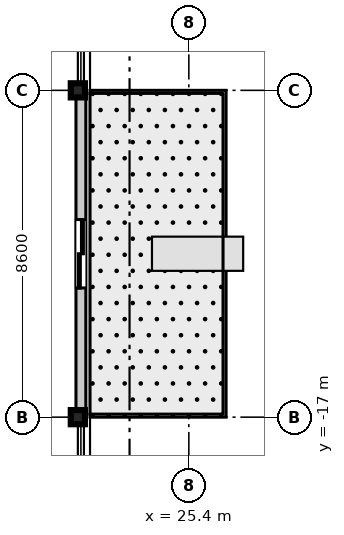
"""IFC4 building model, lengths in metres.
Left out: names, types, materials, properties, quantities, classifications, styles, units other than length and angle.
Written with IfcOpenShell. Run it as: python <this file> out.ifc"""

import sys

from ifc_helpers import new_model, si_unit, direction, frame, frame_2d, origin, origin_2d, place, context, subcontext, project, spatial, rectangle, i_section, extrude, source, transform, mapped, element, fill, save


model = new_model("IFC4")
c1 = context("Model", 3, precision=1e-05, world=origin(), true_north=direction((0.0, 1.0)))
c2 = subcontext(c1, "Body", "Model", "MODEL_VIEW")
j1 = project(units=[si_unit("LENGTHUNIT", "METRE"), si_unit("PLANEANGLEUNIT", "RADIAN")], contexts=[c1])
p1 = place(None, origin())
s1 = spatial("IfcSite", under=j1, at=p1, CompositionType="ELEMENT")
p2 = place(p1, origin())
s2 = spatial("IfcBuilding", under=s1, at=p2, CompositionType="ELEMENT")
p3 = place(p2, frame((0.0, 0.0, 311.9)))
s3 = spatial("IfcBuildingStorey", under=s2, at=p3, CompositionType="ELEMENT", Elevation=311.9)
m1 = source(origin(), c2, "Body", "SweptSolid", [
    extrude(i_section(OverallWidth=0.374, OverallDepth=0.374, WebThickness=0.014, FlangeThickness=0.023, at=origin_2d()), origin(), (0.0, 0.0, 1.0), 3.805),
])
for number, where, z_axis, x_axis in (
    (1, (22.48, -17.0, 0.0), (0.0, 0.0, 1.0), (1.0, 0.0, 0.0)),
    (2, (22.48, -8.4, 0.0), (0.0, 0.0, 1.0), (1.0, 0.0, 0.0)),
):
    element("IfcColumn", number, at=place(p3, frame(where, z_axis=z_axis, x_axis=x_axis)), inside=s3, PredefinedType="COLUMN", context=c2, shape_type="MappedRepresentation", body=[
        mapped(m1, transform((0.0, 0.0, 0.0), scale=1.0)),
    ])
m2 = source(origin(), c2, "Body", "SweptSolid", [
    extrude(rectangle(XDim=8.6, YDim=0.26, at=frame_2d((4.3, 0.0))), origin(), (0.0, 0.0, 1.0), 3.03),
])
p4 = place(p3, frame((22.56, -17.0, 0.0), z_axis=(0.0, 0.0, 1.0), x_axis=(0.0, 1.0, 0.0)))
e3 = element("IfcWall", 3, at=p4, inside=s3, PredefinedType="STANDARD", context=c2, shape_type="MappedRepresentation", body=[
    mapped(m2, transform((0.0, 0.0, 0.0), scale=1.0)),
])
p5 = place(p4, frame((3.4, 0.0, 0.0)))
e4 = element("IfcOpeningElement", 4, at=p5, cuts=e3, PredefinedType="OPENING", context=c2, shape_type="SweptSolid", body=[
    extrude(rectangle(XDim=1.8, YDim=2.25, at=frame_2d((0.9, 1.125))), frame((0.0, 0.14, 0.0), z_axis=(0.0, -1.0, 0.0), x_axis=(1.0, 0.0, 0.0)), (0.0, 0.0, 1.0), 0.28),
])
m3 = source(origin(), c2, "Body", "SweptSolid", [
    extrude(rectangle(XDim=1.8, YDim=2.25, at=frame_2d((0.9, 1.125))), frame((0.0, 0.025, 0.0), z_axis=(0.0, -1.0, 0.0), x_axis=(1.0, 0.0, 0.0)), (0.0, 0.0, 1.0), 0.05),
])
p6 = place(p5, frame((1.8, 0.0, 0.0), z_axis=(0.0, 0.0, 1.0), x_axis=(-1.0, 0.0, 0.0)))
e5 = element("IfcDoor", 5, at=p6, inside=s3, OperationType="DOUBLE_DOOR_SLIDING", PredefinedType="DOOR", context=c2, shape_type="MappedRepresentation", body=[
    mapped(m3, transform((0.0, 0.0, 0.0), scale=1.0)),
])
fill(e4, e5)
save(model, sys.argv[1])
